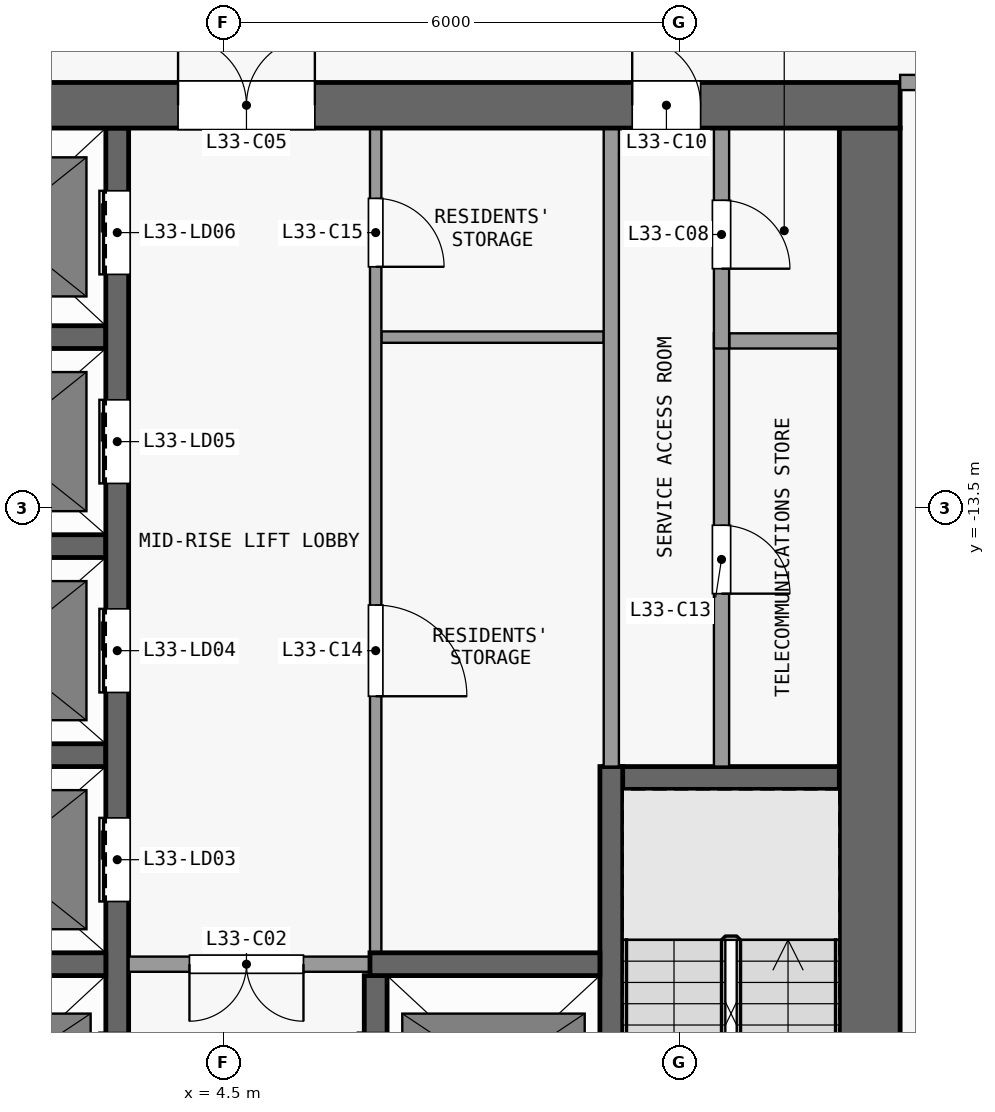
"""IFC4 building model, lengths in metres.
Left out: names, types, materials, properties, quantities, classifications, styles, units other than length and angle.
Written with IfcOpenShell. Run it as: python <this file> out.ifc"""

import sys

from ifc_helpers import new_model, si_unit, direction, frame, frame_2d, origin, place, context, subcontext, project, spatial, rectangle, extrude, element, fill, save


model = new_model("IFC4")
c1 = context("Model", 3, precision=1e-05, world=origin(), true_north=direction((0.0, 1.0)))
c2 = subcontext(c1, "Body", "Model", "MODEL_VIEW")
j1 = project(units=[si_unit("LENGTHUNIT", "METRE"), si_unit("PLANEANGLEUNIT", "RADIAN")], contexts=[c1])
p1 = place(None, origin())
s1 = spatial("IfcSite", under=j1, at=p1, CompositionType="ELEMENT")
p2 = place(p1, origin())
s2 = spatial("IfcBuilding", under=s1, at=p2, CompositionType="ELEMENT")
p3 = place(p2, frame((0.0, 0.0, 133.9)))
s3 = spatial("IfcBuildingStorey", under=s2, at=p3, CompositionType="ELEMENT", Elevation=133.9)
p4 = place(p3, frame((-13.4, -8.2, 0.0), z_axis=(0.0, 0.0, 1.0), x_axis=(1.0, 0.0, 0.0)))
e1 = element("IfcWall", 1, at=p4, inside=s3, PredefinedType="SHEAR", context=c2, shape_type="SweptSolid", body=[
    extrude(rectangle(XDim=26.8, YDim=0.6, at=frame_2d((13.4, 0.0))), origin(), (0.0, 0.0, 1.0), 4.7),
])
p5 = place(p4, frame((7.7, 0.0, 0.0)))
e2 = element("IfcOpeningElement", 2, at=p5, cuts=e1, PredefinedType="OPENING", context=c2, shape_type="SweptSolid", body=[
    extrude(rectangle(XDim=1.8, YDim=2.1, at=frame_2d((0.9, 1.05))), frame((0.0, 0.31, 0.0), z_axis=(0.0, -1.0, 0.0), x_axis=(1.0, 0.0, 0.0)), (0.0, 0.0, 1.0), 0.62),
])
p6 = place(p4, frame((17.3, 0.0, 0.0)))
e3 = element("IfcOpeningElement", 3, at=p6, cuts=e1, PredefinedType="OPENING", context=c2, shape_type="SweptSolid", body=[
    extrude(rectangle(XDim=1.8, YDim=2.1, at=frame_2d((0.9, 1.05))), frame((0.0, 0.31, 0.0), z_axis=(0.0, -1.0, 0.0), x_axis=(1.0, 0.0, 0.0)), (0.0, 0.0, 1.0), 0.62),
])
p7 = place(p4, frame((2.625, 0.0, 0.0)))
e4 = element("IfcOpeningElement", 4, at=p7, cuts=e1, PredefinedType="OPENING", context=c2, shape_type="SweptSolid", body=[
    extrude(rectangle(XDim=0.9, YDim=2.1, at=frame_2d((0.45, 1.05))), frame((0.0, 0.31, 0.0), z_axis=(0.0, -1.0, 0.0), x_axis=(1.0, 0.0, 0.0)), (0.0, 0.0, 1.0), 0.62),
])
p8 = place(p4, frame((23.275, 0.0, 0.0)))
e5 = element("IfcOpeningElement", 5, at=p8, cuts=e1, PredefinedType="OPENING", context=c2, shape_type="SweptSolid", body=[
    extrude(rectangle(XDim=0.9, YDim=2.1, at=frame_2d((0.45, 1.05))), frame((0.0, 0.31, 0.0), z_axis=(0.0, -1.0, 0.0), x_axis=(1.0, 0.0, 0.0)), (0.0, 0.0, 1.0), 0.62),
])
p9 = place(p3, frame((13.0, -24.6, 0.0), z_axis=(0.0, 0.0, 1.0), x_axis=(0.0, 1.0, 0.0)))
e6 = element("IfcWall", 6, at=p9, inside=s3, PredefinedType="SHEAR", context=c2, shape_type="SweptSolid", body=[
    extrude(rectangle(XDim=16.1, YDim=0.8, at=frame_2d((8.05, 0.0))), origin(), (0.0, 0.0, 1.0), 4.7),
])
p10 = place(p3, frame((0.15, -19.5, 0.0), z_axis=(0.0, 0.0, 1.0), x_axis=(1.0, 0.0, 0.0)))
e7 = element("IfcWall", 7, at=p10, inside=s3, PredefinedType="SHEAR", context=c2, shape_type="SweptSolid", body=[
    extrude(rectangle(XDim=2.8, YDim=0.3, at=frame_2d((1.4, 0.0))), origin(), (0.0, 0.0, 1.0), 4.7),
])
p11 = place(p3, frame((6.575, -19.5, 0.0), z_axis=(0.0, 0.0, 1.0), x_axis=(-1.0, 0.0, 0.0)))
e8 = element("IfcWall", 8, at=p11, inside=s3, PredefinedType="PARTITIONING", context=c2, shape_type="SweptSolid", body=[
    extrude(rectangle(XDim=3.325, YDim=0.2, at=frame_2d((1.663, 0.0))), origin(), (0.0, 0.0, 1.0), 4.7),
])
p12 = place(p11, frame((1.025, 0.0, 0.0)))
e9 = element("IfcOpeningElement", 9, at=p12, cuts=e8, PredefinedType="OPENING", context=c2, shape_type="SweptSolid", body=[
    extrude(rectangle(XDim=1.5, YDim=2.1, at=frame_2d((0.75, 1.05))), frame((0.0, 0.11, 0.0), z_axis=(0.0, -1.0, 0.0), x_axis=(1.0, 0.0, 0.0)), (0.0, 0.0, 1.0), 0.22),
])
p13 = place(p3, frame((6.425, -19.5, 0.0), z_axis=(0.0, 0.0, 1.0), x_axis=(1.0, 0.0, 0.0)))
e10 = element("IfcWall", 10, at=p13, inside=s3, PredefinedType="SHEAR", context=c2, shape_type="SweptSolid", body=[
    extrude(rectangle(XDim=3.025, YDim=0.3, at=frame_2d((1.512, 0.0))), origin(), (0.0, 0.0, 1.0), 4.7),
])
p14 = place(p3, frame((9.5, -17.05, 0.0), z_axis=(0.0, 0.0, 1.0), x_axis=(1.0, 0.0, 0.0)))
e11 = element("IfcWall", 11, at=p14, inside=s3, PredefinedType="SHEAR", context=c2, shape_type="SweptSolid", body=[
    extrude(rectangle(XDim=3.1, YDim=0.3, at=frame_2d((1.55, 0.0))), origin(), (0.0, 0.0, 1.0), 4.7),
])
for number, where, z_axis, x_axis in (
    (12, (0.15, -16.75, 0.0), (0.0, 0.0, 1.0), (1.0, 0.0, 0.0)),
    (13, (0.15, -14.0, 0.0), (0.0, 0.0, 1.0), (1.0, 0.0, 0.0)),
):
    element("IfcWall", number, at=place(p3, frame(where, z_axis=z_axis, x_axis=x_axis)), inside=s3, PredefinedType="SHEAR", context=c2, shape_type="SweptSolid", body=[
        extrude(rectangle(XDim=2.8, YDim=0.3, at=frame_2d((1.4, 0.0))), origin(), (0.0, 0.0, 1.0), 4.7),
    ])
p15 = place(p3, frame((11.15, -11.3, 0.0), z_axis=(0.0, 0.0, 1.0), x_axis=(1.0, 0.0, 0.0)))
e14 = element("IfcWall", 14, at=p15, inside=s3, PredefinedType="PARTITIONING", context=c2, shape_type="SweptSolid", body=[
    extrude(rectangle(XDim=1.45, YDim=0.2, at=frame_2d((0.725, 0.0))), origin(), (0.0, 0.0, 1.0), 4.7),
])
p16 = place(p3, frame((0.15, -11.25, 0.0), z_axis=(0.0, 0.0, 1.0), x_axis=(1.0, 0.0, 0.0)))
e15 = element("IfcWall", 15, at=p16, inside=s3, PredefinedType="SHEAR", context=c2, shape_type="SweptSolid", body=[
    extrude(rectangle(XDim=2.8, YDim=0.3, at=frame_2d((1.4, 0.0))), origin(), (0.0, 0.0, 1.0), 4.7),
])
p17 = place(p3, frame((6.575, -11.25, 0.0), z_axis=(0.0, 0.0, 1.0), x_axis=(1.0, 0.0, 0.0)))
e16 = element("IfcWall", 16, at=p17, inside=s3, PredefinedType="PARTITIONING", context=c2, shape_type="SweptSolid", body=[
    extrude(rectangle(XDim=2.925, YDim=0.15, at=frame_2d((1.462, 0.0))), origin(), (0.0, 0.0, 1.0), 4.7),
])
p18 = place(p3, frame((3.1, -22.55, 0.0), z_axis=(0.0, 0.0, 1.0), x_axis=(0.0, 1.0, 0.0)))
e17 = element("IfcWall", 17, at=p18, inside=s3, PredefinedType="SHEAR", context=c2, shape_type="SweptSolid", body=[
    extrude(rectangle(XDim=14.05, YDim=0.3, at=frame_2d((7.025, 0.0))), origin(), (0.0, 0.0, 1.0), 4.7),
])
p19 = place(p18, frame((1.05, 0.0, 0.0)))
e18 = element("IfcOpeningElement", 18, at=p19, cuts=e17, PredefinedType="OPENING", context=c2, shape_type="SweptSolid", body=[
    extrude(rectangle(XDim=1.1, YDim=2.1, at=frame_2d((0.55, 1.05))), frame((0.0, 0.16, 0.0), z_axis=(0.0, -1.0, 0.0), x_axis=(1.0, 0.0, 0.0)), (0.0, 0.0, 1.0), 0.32),
])
p20 = place(p18, frame((3.875, 0.0, 0.0)))
e19 = element("IfcOpeningElement", 19, at=p20, cuts=e17, PredefinedType="OPENING", context=c2, shape_type="SweptSolid", body=[
    extrude(rectangle(XDim=1.1, YDim=2.1, at=frame_2d((0.55, 1.05))), frame((0.0, 0.16, 0.0), z_axis=(0.0, -1.0, 0.0), x_axis=(1.0, 0.0, 0.0)), (0.0, 0.0, 1.0), 0.32),
])
p21 = place(p18, frame((6.625, 0.0, 0.0)))
e20 = element("IfcOpeningElement", 20, at=p21, cuts=e17, PredefinedType="OPENING", context=c2, shape_type="SweptSolid", body=[
    extrude(rectangle(XDim=1.1, YDim=2.1, at=frame_2d((0.55, 1.05))), frame((0.0, 0.16, 0.0), z_axis=(0.0, -1.0, 0.0), x_axis=(1.0, 0.0, 0.0)), (0.0, 0.0, 1.0), 0.32),
])
p22 = place(p18, frame((9.375, 0.0, 0.0)))
e21 = element("IfcOpeningElement", 21, at=p22, cuts=e17, PredefinedType="OPENING", context=c2, shape_type="SweptSolid", body=[
    extrude(rectangle(XDim=1.1, YDim=2.1, at=frame_2d((0.55, 1.05))), frame((0.0, 0.16, 0.0), z_axis=(0.0, -1.0, 0.0), x_axis=(1.0, 0.0, 0.0)), (0.0, 0.0, 1.0), 0.32),
])
p23 = place(p18, frame((12.125, 0.0, 0.0)))
e22 = element("IfcOpeningElement", 22, at=p23, cuts=e17, PredefinedType="OPENING", context=c2, shape_type="SweptSolid", body=[
    extrude(rectangle(XDim=1.1, YDim=2.1, at=frame_2d((0.55, 1.05))), frame((0.0, 0.16, 0.0), z_axis=(0.0, -1.0, 0.0), x_axis=(1.0, 0.0, 0.0)), (0.0, 0.0, 1.0), 0.32),
])
p24 = place(p3, frame((6.5, -22.25, 0.0), z_axis=(0.0, 0.0, 1.0), x_axis=(0.0, 1.0, 0.0)))
e23 = element("IfcWall", 23, at=p24, inside=s3, PredefinedType="SHEAR", context=c2, shape_type="SweptSolid", body=[
    extrude(rectangle(XDim=2.6, YDim=0.3, at=frame_2d((1.3, 0.0))), origin(), (0.0, 0.0, 1.0), 4.7),
])
p25 = place(p24, frame((0.75, 0.0, 0.0)))
e24 = element("IfcOpeningElement", 24, at=p25, cuts=e23, PredefinedType="OPENING", context=c2, shape_type="SweptSolid", body=[
    extrude(rectangle(XDim=1.1, YDim=2.1, at=frame_2d((0.55, 1.05))), frame((0.0, 0.16, 0.0), z_axis=(0.0, -1.0, 0.0), x_axis=(1.0, 0.0, 0.0)), (0.0, 0.0, 1.0), 0.32),
])
p26 = place(p3, frame((6.5, -8.5, 0.0), z_axis=(0.0, 0.0, 1.0), x_axis=(0.0, -1.0, 0.0)))
e25 = element("IfcWall", 25, at=p26, inside=s3, PredefinedType="PARTITIONING", context=c2, shape_type="SweptSolid", body=[
    extrude(rectangle(XDim=10.85, YDim=0.15, at=frame_2d((5.425, 0.0))), origin(), (0.0, 0.0, 1.0), 4.7),
])
p27 = place(p26, frame((6.275, 0.0, 0.0)))
e26 = element("IfcOpeningElement", 26, at=p27, cuts=e25, PredefinedType="OPENING", context=c2, shape_type="SweptSolid", body=[
    extrude(rectangle(XDim=1.2, YDim=2.1, at=frame_2d((0.6, 1.05))), frame((0.0, 0.085, 0.0), z_axis=(0.0, -1.0, 0.0), x_axis=(1.0, 0.0, 0.0)), (0.0, 0.0, 1.0), 0.17),
])
p28 = place(p26, frame((0.925, 0.0, 0.0)))
e27 = element("IfcOpeningElement", 27, at=p28, cuts=e25, PredefinedType="OPENING", context=c2, shape_type="SweptSolid", body=[
    extrude(rectangle(XDim=0.9, YDim=2.1, at=frame_2d((0.45, 1.05))), frame((0.0, 0.085, 0.0), z_axis=(0.0, -1.0, 0.0), x_axis=(1.0, 0.0, 0.0)), (0.0, 0.0, 1.0), 0.17),
])
p29 = place(p3, frame((9.6, -16.9, 0.0), z_axis=(0.0, 0.0, 1.0), x_axis=(0.0, -1.0, 0.0)))
e28 = element("IfcWall", 28, at=p29, inside=s3, PredefinedType="SHEAR", context=c2, shape_type="SweptSolid", body=[
    extrude(rectangle(XDim=7.7, YDim=0.3, at=frame_2d((3.85, 0.0))), origin(), (0.0, 0.0, 1.0), 4.7),
])
p30 = place(p29, frame((6.5, 0.0, 0.0)))
e29 = element("IfcOpeningElement", 29, at=p30, cuts=e28, PredefinedType="OPENING", context=c2, shape_type="SweptSolid", body=[
    extrude(rectangle(XDim=1.1, YDim=2.1, at=frame_2d((0.55, 1.05))), frame((0.0, 0.16, 0.0), z_axis=(0.0, -1.0, 0.0), x_axis=(1.0, 0.0, 0.0)), (0.0, 0.0, 1.0), 0.32),
])
p31 = place(p3, frame((9.6, -16.9, 0.0), z_axis=(0.0, 0.0, 1.0), x_axis=(0.0, 1.0, 0.0)))
e30 = element("IfcWall", 30, at=p31, inside=s3, PredefinedType="PARTITIONING", context=c2, shape_type="SweptSolid", body=[
    extrude(rectangle(XDim=8.4, YDim=0.2, at=frame_2d((4.2, 0.0))), origin(), (0.0, 0.0, 1.0), 4.7),
])
p32 = place(p3, frame((11.05, -11.2, 0.0), z_axis=(0.0, 0.0, 1.0), x_axis=(0.0, -1.0, 0.0)))
e31 = element("IfcWall", 31, at=p32, inside=s3, PredefinedType="PARTITIONING", context=c2, shape_type="SweptSolid", body=[
    extrude(rectangle(XDim=5.7, YDim=0.2, at=frame_2d((2.85, 0.0))), origin(), (0.0, 0.0, 1.0), 4.7),
])
p33 = place(p32, frame((2.525, 0.0, 0.0)))
e32 = element("IfcOpeningElement", 32, at=p33, cuts=e31, PredefinedType="OPENING", context=c2, shape_type="SweptSolid", body=[
    extrude(rectangle(XDim=0.9, YDim=2.1, at=frame_2d((0.45, 1.05))), frame((0.0, 0.11, 0.0), z_axis=(0.0, -1.0, 0.0), x_axis=(1.0, 0.0, 0.0)), (0.0, 0.0, 1.0), 0.22),
])
p34 = place(p3, frame((11.05, -8.5, 0.0), z_axis=(0.0, 0.0, 1.0), x_axis=(0.0, -1.0, 0.0)))
e33 = element("IfcWall", 33, at=p34, inside=s3, PredefinedType="PARTITIONING", context=c2, shape_type="SweptSolid", body=[
    extrude(rectangle(XDim=2.9, YDim=0.2, at=frame_2d((1.45, 0.0))), origin(), (0.0, 0.0, 1.0), 4.7),
])
p35 = place(p34, frame((0.95, 0.0, 0.0)))
e34 = element("IfcOpeningElement", 34, at=p35, cuts=e33, PredefinedType="OPENING", context=c2, shape_type="SweptSolid", body=[
    extrude(rectangle(XDim=0.9, YDim=2.1, at=frame_2d((0.45, 1.05))), frame((0.0, 0.11, 0.0), z_axis=(0.0, -1.0, 0.0), x_axis=(1.0, 0.0, 0.0)), (0.0, 0.0, 1.0), 0.22),
])
p36 = place(p3, frame((13.4, -7.9, 0.0), z_axis=(0.0, 0.0, 1.0), x_axis=(1.0, 0.0, 0.0)))
e35 = element("IfcWall", 35, at=p36, inside=s3, PredefinedType="PARTITIONING", context=c2, shape_type="SweptSolid", body=[
    extrude(rectangle(XDim=11.838, YDim=0.2, at=frame_2d((5.919, 0.0))), origin(), (0.0, 0.0, 1.0), 4.7),
])
p37 = place(p36, frame((1.5, 0.0, 0.0)))
e36 = element("IfcOpeningElement", 36, at=p37, cuts=e35, PredefinedType="OPENING", context=c2, shape_type="SweptSolid", body=[
    extrude(rectangle(XDim=1.8, YDim=2.1, at=frame_2d((0.9, 1.05))), frame((0.0, 0.11, 0.0), z_axis=(0.0, -1.0, 0.0), x_axis=(1.0, 0.0, 0.0)), (0.0, 0.0, 1.0), 0.22),
])
p38 = place(p36, frame((8.7, 0.0, 0.0)))
e37 = element("IfcOpeningElement", 37, at=p38, cuts=e35, PredefinedType="OPENING", context=c2, shape_type="SweptSolid", body=[
    extrude(rectangle(XDim=1.8, YDim=2.1, at=frame_2d((0.9, 1.05))), frame((0.0, 0.11, 0.0), z_axis=(0.0, -1.0, 0.0), x_axis=(1.0, 0.0, 0.0)), (0.0, 0.0, 1.0), 0.22),
])
p39 = place(p20, origin())
e38 = element("IfcDoor", 38, at=p39, inside=s3, OperationType="DOUBLE_DOOR_SLIDING", PredefinedType="DOOR", context=c2, shape_type="SweptSolid", body=[
    extrude(rectangle(XDim=1.1, YDim=2.1, at=frame_2d((0.55, 1.05))), frame((0.0, 0.025, 0.0), z_axis=(0.0, -1.0, 0.0), x_axis=(1.0, 0.0, 0.0)), (0.0, 0.0, 1.0), 0.05),
])
fill(e19, e38)
p40 = place(p21, origin())
e39 = element("IfcDoor", 39, at=p40, inside=s3, OperationType="DOUBLE_DOOR_SLIDING", PredefinedType="DOOR", context=c2, shape_type="SweptSolid", body=[
    extrude(rectangle(XDim=1.1, YDim=2.1, at=frame_2d((0.55, 1.05))), frame((0.0, 0.025, 0.0), z_axis=(0.0, -1.0, 0.0), x_axis=(1.0, 0.0, 0.0)), (0.0, 0.0, 1.0), 0.05),
])
fill(e20, e39)
p41 = place(p22, origin())
e40 = element("IfcDoor", 40, at=p41, inside=s3, OperationType="DOUBLE_DOOR_SLIDING", PredefinedType="DOOR", context=c2, shape_type="SweptSolid", body=[
    extrude(rectangle(XDim=1.1, YDim=2.1, at=frame_2d((0.55, 1.05))), frame((0.0, 0.025, 0.0), z_axis=(0.0, -1.0, 0.0), x_axis=(1.0, 0.0, 0.0)), (0.0, 0.0, 1.0), 0.05),
])
fill(e21, e40)
p42 = place(p23, origin())
e41 = element("IfcDoor", 41, at=p42, inside=s3, OperationType="DOUBLE_DOOR_SLIDING", PredefinedType="DOOR", context=c2, shape_type="SweptSolid", body=[
    extrude(rectangle(XDim=1.1, YDim=2.1, at=frame_2d((0.55, 1.05))), frame((0.0, 0.025, 0.0), z_axis=(0.0, -1.0, 0.0), x_axis=(1.0, 0.0, 0.0)), (0.0, 0.0, 1.0), 0.05),
])
fill(e22, e41)
p43 = place(p12, origin())
e42 = element("IfcDoor", 42, at=p43, inside=s3, OperationType="DOUBLE_DOOR_SINGLE_SWING", PredefinedType="DOOR", context=c2, shape_type="SweptSolid", body=[
    extrude(rectangle(XDim=1.5, YDim=2.1, at=frame_2d((0.75, 1.05))), frame((0.0, 0.025, 0.0), z_axis=(0.0, -1.0, 0.0), x_axis=(1.0, 0.0, 0.0)), (0.0, 0.0, 1.0), 0.05),
])
fill(e9, e42)
p44 = place(p6, origin())
e43 = element("IfcDoor", 43, at=p44, inside=s3, OperationType="DOUBLE_DOOR_SINGLE_SWING", PredefinedType="DOOR", context=c2, shape_type="SweptSolid", body=[
    extrude(rectangle(XDim=1.8, YDim=2.1, at=frame_2d((0.9, 1.05))), frame((0.0, 0.025, 0.0), z_axis=(0.0, -1.0, 0.0), x_axis=(1.0, 0.0, 0.0)), (0.0, 0.0, 1.0), 0.05),
])
fill(e3, e43)
p45 = place(p35, origin())
e44 = element("IfcDoor", 44, at=p45, inside=s3, OperationType="SINGLE_SWING_RIGHT", PredefinedType="DOOR", context=c2, shape_type="SweptSolid", body=[
    extrude(rectangle(XDim=0.9, YDim=2.1, at=frame_2d((0.45, 1.05))), frame((0.0, 0.025, 0.0), z_axis=(0.0, -1.0, 0.0), x_axis=(1.0, 0.0, 0.0)), (0.0, 0.0, 1.0), 0.05),
])
fill(e34, e44)
p46 = place(p8, origin())
e45 = element("IfcDoor", 45, at=p46, inside=s3, OperationType="SINGLE_SWING_LEFT", PredefinedType="DOOR", context=c2, shape_type="SweptSolid", body=[
    extrude(rectangle(XDim=0.9, YDim=2.1, at=frame_2d((0.45, 1.05))), frame((0.0, 0.025, 0.0), z_axis=(0.0, -1.0, 0.0), x_axis=(1.0, 0.0, 0.0)), (0.0, 0.0, 1.0), 0.05),
])
fill(e5, e45)
p47 = place(p33, origin())
e46 = element("IfcDoor", 46, at=p47, inside=s3, OperationType="SINGLE_SWING_RIGHT", PredefinedType="DOOR", context=c2, shape_type="SweptSolid", body=[
    extrude(rectangle(XDim=0.9, YDim=2.1, at=frame_2d((0.45, 1.05))), frame((0.0, 0.025, 0.0), z_axis=(0.0, -1.0, 0.0), x_axis=(1.0, 0.0, 0.0)), (0.0, 0.0, 1.0), 0.05),
])
fill(e32, e46)
p48 = place(p27, origin())
e47 = element("IfcDoor", 47, at=p48, inside=s3, OperationType="SINGLE_SWING_RIGHT", PredefinedType="DOOR", context=c2, shape_type="SweptSolid", body=[
    extrude(rectangle(XDim=1.2, YDim=2.1, at=frame_2d((0.6, 1.05))), frame((0.0, 0.025, 0.0), z_axis=(0.0, -1.0, 0.0), x_axis=(1.0, 0.0, 0.0)), (0.0, 0.0, 1.0), 0.05),
])
fill(e26, e47)
p49 = place(p28, origin())
e48 = element("IfcDoor", 48, at=p49, inside=s3, OperationType="SINGLE_SWING_RIGHT", PredefinedType="DOOR", context=c2, shape_type="SweptSolid", body=[
    extrude(rectangle(XDim=0.9, YDim=2.1, at=frame_2d((0.45, 1.05))), frame((0.0, 0.025, 0.0), z_axis=(0.0, -1.0, 0.0), x_axis=(1.0, 0.0, 0.0)), (0.0, 0.0, 1.0), 0.05),
])
fill(e27, e48)
save(model, sys.argv[1])
